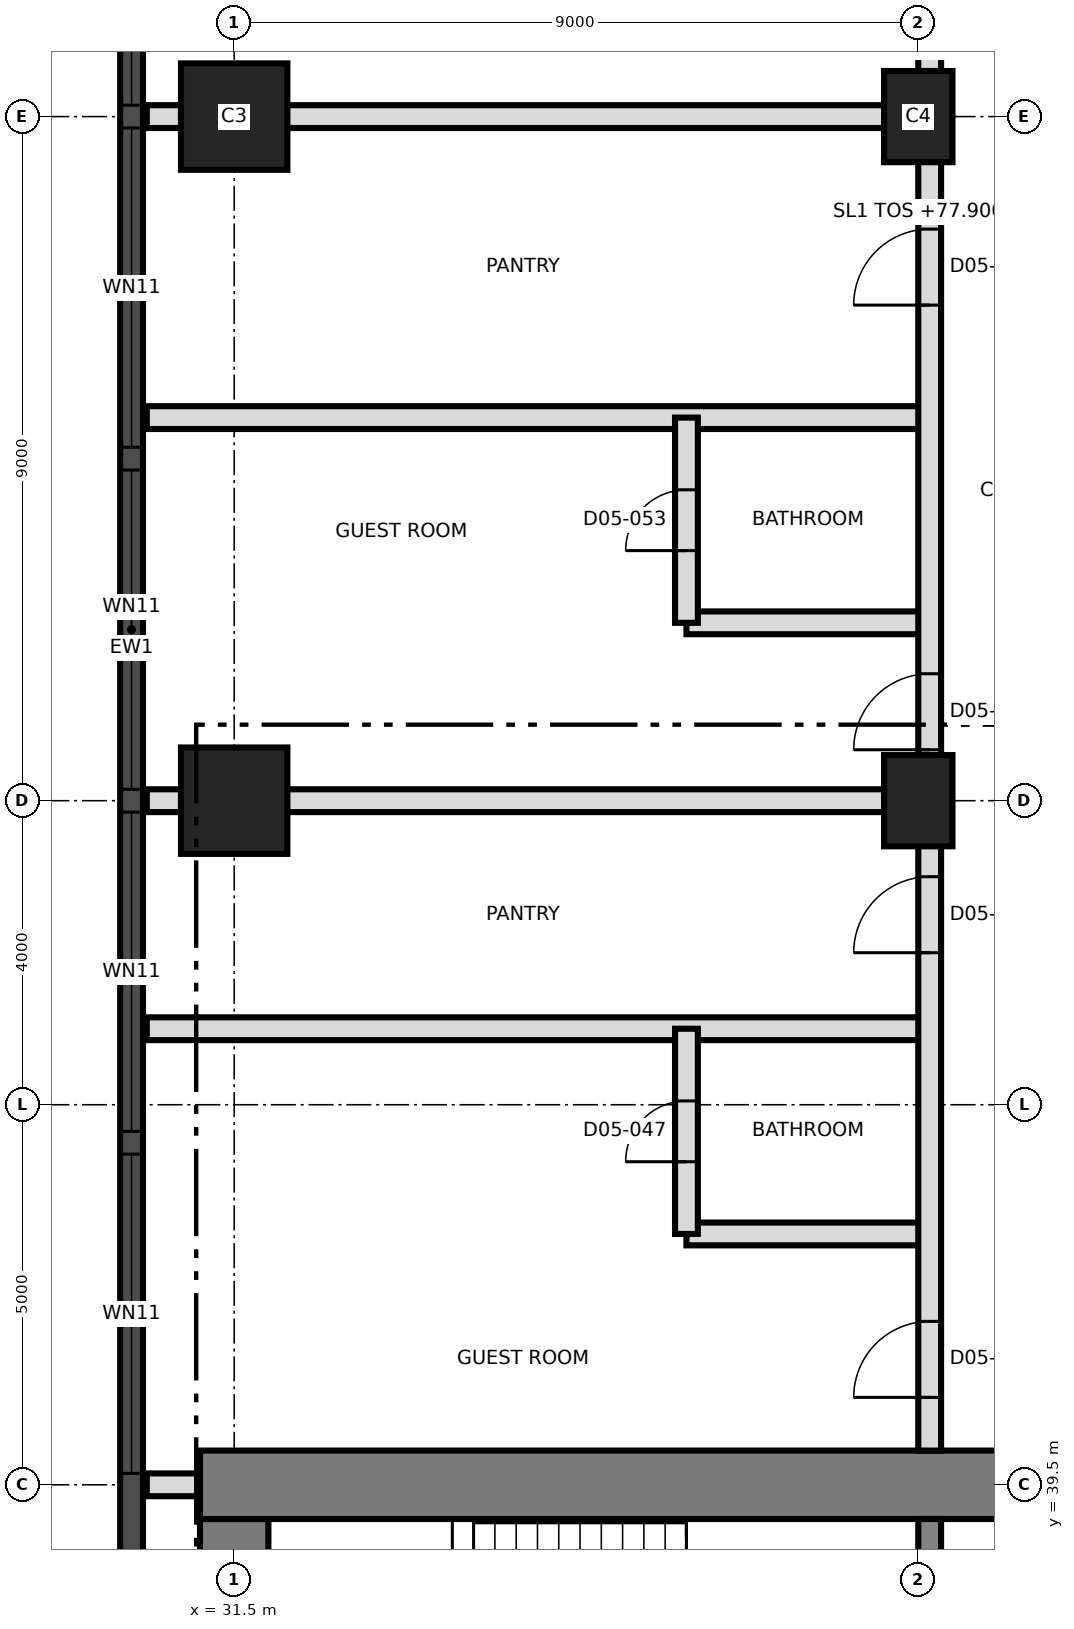
"""IFC4 building model, lengths in metres.
Left out: names, types, materials, properties, quantities, classifications, styles, units other than length and angle.
Written with IfcOpenShell. Run it as: python <this file> out.ifc"""

import sys

from ifc_helpers import new_model, si_unit, direction, frame, frame_2d, origin, origin_2d, place, context, subcontext, project, spatial, rectangle, extrude, element, fill, save


model = new_model("IFC4")
c1 = context("Model", 3, precision=1e-05, world=origin(), true_north=direction((0.0, 1.0)))
c2 = subcontext(c1, "Body", "Model", "MODEL_VIEW")
j1 = project(units=[si_unit("LENGTHUNIT", "METRE"), si_unit("PLANEANGLEUNIT", "RADIAN")], contexts=[c1])
p1 = place(None, origin())
s1 = spatial("IfcSite", under=j1, at=p1, CompositionType="ELEMENT")
p2 = place(p1, origin())
s2 = spatial("IfcBuilding", under=s1, at=p2, CompositionType="ELEMENT")
p3 = place(p2, frame((0.0, 0.0, 77.9)))
s3 = spatial("IfcBuildingStorey", under=s2, at=p3, CompositionType="ELEMENT", Elevation=77.9)
p4 = place(p3, frame((31.5, 21.95, 0.0), z_axis=(0.0, 0.0, 1.0), x_axis=(0.0, 1.0, 0.0)))
e1 = element("IfcWall", 1, at=p4, inside=s3, PredefinedType="SHEAR", context=c2, shape_type="SweptSolid", body=[
    extrude(rectangle(XDim=17.1, YDim=0.9, at=frame_2d((8.55, 0.0))), origin(), (0.0, 0.0, 1.0), 3.7),
])
p5 = place(p3, frame((31.05, 39.5, 0.0), z_axis=(0.0, 0.0, 1.0), x_axis=(1.0, 0.0, 0.0)))
e2 = element("IfcWall", 2, at=p5, inside=s3, PredefinedType="SHEAR", context=c2, shape_type="SweptSolid", body=[
    extrude(rectangle(XDim=27.0, YDim=0.9, at=frame_2d((13.5, 0.0))), origin(), (0.0, 0.0, 1.0), 3.7),
])
p6 = place(p5, frame((10.65, 0.0, 0.0)))
e3 = element("IfcOpeningElement", 3, at=p6, cuts=e2, PredefinedType="OPENING", context=c2, shape_type="SweptSolid", body=[
    extrude(rectangle(XDim=1.2, YDim=2.1, at=frame_2d((0.6, 1.05))), frame((0.0, 0.46, 0.0), z_axis=(0.0, -1.0, 0.0), x_axis=(1.0, 0.0, 0.0)), (0.0, 0.0, 1.0), 0.92),
])
p7 = place(p3, frame((40.65, 33.5, 0.0), z_axis=(0.0, 0.0, 1.0), x_axis=(0.0, 1.0, 0.0)))
e4 = element("IfcWall", 4, at=p7, inside=s3, PredefinedType="SHEAR", context=c2, shape_type="SweptSolid", body=[
    extrude(rectangle(XDim=5.55, YDim=0.3, at=frame_2d((2.775, 0.0))), origin(), (0.0, 0.0, 1.0), 3.7),
])
p8 = place(p3, frame((31.5, 48.5, 0.0), z_axis=(0.0, 0.0, 1.0), x_axis=(1.0, 0.0, 0.0)))
e5 = element("IfcColumn", 5, at=p8, inside=s3, PredefinedType="COLUMN", context=c2, shape_type="SweptSolid", body=[
    extrude(rectangle(XDim=1.4, YDim=1.4, at=origin_2d()), origin(), (0.0, 0.0, 1.0), 3.7),
])
p9 = place(p3, frame((40.5, 48.5, 0.0), z_axis=(0.0, 0.0, 1.0), x_axis=(0.0, 1.0, 0.0)))
e6 = element("IfcColumn", 6, at=p9, inside=s3, PredefinedType="COLUMN", context=c2, shape_type="SweptSolid", body=[
    extrude(rectangle(XDim=1.2, YDim=0.9, at=origin_2d()), origin(), (0.0, 0.0, 1.0), 3.7),
])
p10 = place(p3, frame((31.5, 57.5, 0.0), z_axis=(0.0, 0.0, 1.0), x_axis=(1.0, 0.0, 0.0)))
e7 = element("IfcColumn", 7, at=p10, inside=s3, PredefinedType="COLUMN", context=c2, shape_type="SweptSolid", body=[
    extrude(rectangle(XDim=1.4, YDim=1.4, at=origin_2d()), origin(), (0.0, 0.0, 1.0), 3.7),
])
p11 = place(p3, frame((40.5, 57.5, 0.0), z_axis=(0.0, 0.0, 1.0), x_axis=(0.0, 1.0, 0.0)))
e8 = element("IfcColumn", 8, at=p11, inside=s3, PredefinedType="COLUMN", context=c2, shape_type="SweptSolid", body=[
    extrude(rectangle(XDim=1.2, YDim=0.9, at=origin_2d()), origin(), (0.0, 0.0, 1.0), 3.7),
])
p12 = place(p3, frame((30.15, 66.992, 0.0), z_axis=(0.0, 0.0, 1.0), x_axis=(0.0, -1.0, 0.0)))
e9 = element("IfcWall", 9, at=p12, inside=s3, PredefinedType="SOLIDWALL", context=c2, shape_type="SweptSolid", body=[
    extrude(rectangle(XDim=32.968, YDim=0.3, at=frame_2d((16.484, 0.0))), origin(), (0.0, 0.0, 1.0), 3.4),
])
p13 = place(p12, frame((1.596, 0.0, 0.3)))
e10 = element("IfcOpeningElement", 10, at=p13, cuts=e9, PredefinedType="OPENING", context=c2, shape_type="SweptSolid", body=[
    extrude(rectangle(XDim=1.8, YDim=2.4, at=frame_2d((0.9, 1.2))), frame((0.0, 0.16, 0.0), z_axis=(0.0, -1.0, 0.0), x_axis=(1.0, 0.0, 0.0)), (0.0, 0.0, 1.0), 0.32),
])
p14 = place(p12, frame((5.142, 0.0, 0.9)))
e11 = element("IfcOpeningElement", 11, at=p14, cuts=e9, PredefinedType="OPENING", context=c2, shape_type="SweptSolid", body=[
    extrude(rectangle(XDim=4.2, YDim=1.5, at=frame_2d((2.1, 0.75))), frame((0.0, 0.16, 0.0), z_axis=(0.0, -1.0, 0.0), x_axis=(1.0, 0.0, 0.0)), (0.0, 0.0, 1.0), 0.32),
])
p15 = place(p12, frame((9.642, 0.0, 0.9)))
e12 = element("IfcOpeningElement", 12, at=p15, cuts=e9, PredefinedType="OPENING", context=c2, shape_type="SweptSolid", body=[
    extrude(rectangle(XDim=4.2, YDim=1.5, at=frame_2d((2.1, 0.75))), frame((0.0, 0.16, 0.0), z_axis=(0.0, -1.0, 0.0), x_axis=(1.0, 0.0, 0.0)), (0.0, 0.0, 1.0), 0.32),
])
p16 = place(p12, frame((14.142, 0.0, 0.9)))
e13 = element("IfcOpeningElement", 13, at=p16, cuts=e9, PredefinedType="OPENING", context=c2, shape_type="SweptSolid", body=[
    extrude(rectangle(XDim=4.2, YDim=1.5, at=frame_2d((2.1, 0.75))), frame((0.0, 0.16, 0.0), z_axis=(0.0, -1.0, 0.0), x_axis=(1.0, 0.0, 0.0)), (0.0, 0.0, 1.0), 0.32),
])
p17 = place(p12, frame((18.642, 0.0, 0.9)))
e14 = element("IfcOpeningElement", 14, at=p17, cuts=e9, PredefinedType="OPENING", context=c2, shape_type="SweptSolid", body=[
    extrude(rectangle(XDim=4.2, YDim=1.5, at=frame_2d((2.1, 0.75))), frame((0.0, 0.16, 0.0), z_axis=(0.0, -1.0, 0.0), x_axis=(1.0, 0.0, 0.0)), (0.0, 0.0, 1.0), 0.32),
])
p18 = place(p12, frame((23.142, 0.0, 0.9)))
e15 = element("IfcOpeningElement", 15, at=p18, cuts=e9, PredefinedType="OPENING", context=c2, shape_type="SweptSolid", body=[
    extrude(rectangle(XDim=4.2, YDim=1.5, at=frame_2d((2.1, 0.75))), frame((0.0, 0.16, 0.0), z_axis=(0.0, -1.0, 0.0), x_axis=(1.0, 0.0, 0.0)), (0.0, 0.0, 1.0), 0.32),
])
p19 = place(p12, frame((29.33, 0.0, 0.3)))
e16 = element("IfcOpeningElement", 16, at=p19, cuts=e9, PredefinedType="OPENING", context=c2, shape_type="SweptSolid", body=[
    extrude(rectangle(XDim=1.8, YDim=2.4, at=frame_2d((0.9, 1.2))), frame((0.0, 0.16, 0.0), z_axis=(0.0, -1.0, 0.0), x_axis=(1.0, 0.0, 0.0)), (0.0, 0.0, 1.0), 0.32),
])
p20 = place(p3, frame((30.35, 39.5, 0.0), z_axis=(0.0, 0.0, 1.0), x_axis=(1.0, 0.0, 0.0)))
e17 = element("IfcWall", 17, at=p20, inside=s3, PredefinedType="PARTITIONING", context=c2, shape_type="SweptSolid", body=[
    extrude(rectangle(XDim=0.68, YDim=0.3, at=frame_2d((0.34, 0.0))), origin(), (0.0, 0.0, 1.0), 3.4),
])
p21 = place(p3, frame((37.45, 42.8, 0.0), z_axis=(0.0, 0.0, 1.0), x_axis=(1.0, 0.0, 0.0)))
e18 = element("IfcWall", 18, at=p21, inside=s3, PredefinedType="PARTITIONING", context=c2, shape_type="SweptSolid", body=[
    extrude(rectangle(XDim=3.2, YDim=0.3, at=frame_2d((1.6, 0.0))), origin(), (0.0, 0.0, 1.0), 3.4),
])
for number, where, z_axis, x_axis in (
    (19, (30.35, 45.5, 0.0), (0.0, 0.0, 1.0), (1.0, 0.0, 0.0)),
    (20, (30.35, 48.5, 0.0), (0.0, 0.0, 1.0), (1.0, 0.0, 0.0)),
):
    element("IfcWall", number, at=place(p3, frame(where, z_axis=z_axis, x_axis=x_axis)), inside=s3, PredefinedType="PARTITIONING", context=c2, shape_type="SweptSolid", body=[
        extrude(rectangle(XDim=10.3, YDim=0.3, at=frame_2d((5.15, 0.0))), origin(), (0.0, 0.0, 1.0), 3.4),
    ])
p22 = place(p3, frame((37.45, 50.84, 0.0), z_axis=(0.0, 0.0, 1.0), x_axis=(1.0, 0.0, 0.0)))
e21 = element("IfcWall", 21, at=p22, inside=s3, PredefinedType="PARTITIONING", context=c2, shape_type="SweptSolid", body=[
    extrude(rectangle(XDim=3.2, YDim=0.3, at=frame_2d((1.6, 0.0))), origin(), (0.0, 0.0, 1.0), 3.4),
])
for number, where, z_axis, x_axis in (
    (22, (30.35, 53.54, 0.0), (0.0, 0.0, 1.0), (1.0, 0.0, 0.0)),
    (23, (30.35, 57.5, 0.0), (0.0, 0.0, 1.0), (1.0, 0.0, 0.0)),
):
    element("IfcWall", number, at=place(p3, frame(where, z_axis=z_axis, x_axis=x_axis)), inside=s3, PredefinedType="PARTITIONING", context=c2, shape_type="SweptSolid", body=[
        extrude(rectangle(XDim=10.3, YDim=0.3, at=frame_2d((5.15, 0.0))), origin(), (0.0, 0.0, 1.0), 3.4),
    ])
p23 = place(p3, frame((37.45, 42.8, 0.0), z_axis=(0.0, 0.0, 1.0), x_axis=(0.0, 1.0, 0.0)))
e24 = element("IfcWall", 24, at=p23, inside=s3, PredefinedType="PARTITIONING", context=c2, shape_type="SweptSolid", body=[
    extrude(rectangle(XDim=2.7, YDim=0.3, at=frame_2d((1.35, 0.0))), origin(), (0.0, 0.0, 1.0), 3.4),
])
p24 = place(p23, frame((0.95, 0.0, 0.0)))
e25 = element("IfcOpeningElement", 25, at=p24, cuts=e24, PredefinedType="OPENING", context=c2, shape_type="SweptSolid", body=[
    extrude(rectangle(XDim=0.8, YDim=2.1, at=frame_2d((0.4, 1.05))), frame((0.0, 0.16, 0.0), z_axis=(0.0, -1.0, 0.0), x_axis=(1.0, 0.0, 0.0)), (0.0, 0.0, 1.0), 0.32),
])
p25 = place(p3, frame((37.45, 50.84, 0.0), z_axis=(0.0, 0.0, 1.0), x_axis=(0.0, 1.0, 0.0)))
e26 = element("IfcWall", 26, at=p25, inside=s3, PredefinedType="PARTITIONING", context=c2, shape_type="SweptSolid", body=[
    extrude(rectangle(XDim=2.7, YDim=0.3, at=frame_2d((1.35, 0.0))), origin(), (0.0, 0.0, 1.0), 3.4),
])
p26 = place(p25, frame((0.95, 0.0, 0.0)))
e27 = element("IfcOpeningElement", 27, at=p26, cuts=e26, PredefinedType="OPENING", context=c2, shape_type="SweptSolid", body=[
    extrude(rectangle(XDim=0.8, YDim=2.1, at=frame_2d((0.4, 1.05))), frame((0.0, 0.16, 0.0), z_axis=(0.0, -1.0, 0.0), x_axis=(1.0, 0.0, 0.0)), (0.0, 0.0, 1.0), 0.32),
])
p27 = place(p3, frame((40.65, 39.95, 0.0), z_axis=(0.0, 0.0, 1.0), x_axis=(0.0, 1.0, 0.0)))
e28 = element("IfcWall", 28, at=p27, inside=s3, PredefinedType="PARTITIONING", context=c2, shape_type="SweptSolid", body=[
    extrude(rectangle(XDim=36.94, YDim=0.3, at=frame_2d((18.47, 0.0))), origin(), (0.0, 0.0, 1.0), 3.4),
])
p28 = place(p27, frame((0.7, 0.0, 0.0)))
e29 = element("IfcOpeningElement", 29, at=p28, cuts=e28, PredefinedType="OPENING", context=c2, shape_type="SweptSolid", body=[
    extrude(rectangle(XDim=1.0, YDim=2.1, at=frame_2d((0.5, 1.05))), frame((0.0, 0.16, 0.0), z_axis=(0.0, -1.0, 0.0), x_axis=(1.0, 0.0, 0.0)), (0.0, 0.0, 1.0), 0.32),
])
p29 = place(p27, frame((6.55, 0.0, 0.0)))
e30 = element("IfcOpeningElement", 30, at=p29, cuts=e28, PredefinedType="OPENING", context=c2, shape_type="SweptSolid", body=[
    extrude(rectangle(XDim=1.0, YDim=2.1, at=frame_2d((0.5, 1.05))), frame((0.0, 0.16, 0.0), z_axis=(0.0, -1.0, 0.0), x_axis=(1.0, 0.0, 0.0)), (0.0, 0.0, 1.0), 0.32),
])
p30 = place(p27, frame((9.22, 0.0, 0.0)))
e31 = element("IfcOpeningElement", 31, at=p30, cuts=e28, PredefinedType="OPENING", context=c2, shape_type="SweptSolid", body=[
    extrude(rectangle(XDim=1.0, YDim=2.1, at=frame_2d((0.5, 1.05))), frame((0.0, 0.16, 0.0), z_axis=(0.0, -1.0, 0.0), x_axis=(1.0, 0.0, 0.0)), (0.0, 0.0, 1.0), 0.32),
])
p31 = place(p27, frame((15.07, 0.0, 0.0)))
e32 = element("IfcOpeningElement", 32, at=p31, cuts=e28, PredefinedType="OPENING", context=c2, shape_type="SweptSolid", body=[
    extrude(rectangle(XDim=1.0, YDim=2.1, at=frame_2d((0.5, 1.05))), frame((0.0, 0.16, 0.0), z_axis=(0.0, -1.0, 0.0), x_axis=(1.0, 0.0, 0.0)), (0.0, 0.0, 1.0), 0.32),
])
p32 = place(p27, frame((21.05, 0.0, 0.0)))
e33 = element("IfcOpeningElement", 33, at=p32, cuts=e28, PredefinedType="OPENING", context=c2, shape_type="SweptSolid", body=[
    extrude(rectangle(XDim=1.0, YDim=2.4, at=frame_2d((0.5, 1.2))), frame((0.0, 0.16, 0.0), z_axis=(0.0, -1.0, 0.0), x_axis=(1.0, 0.0, 0.0)), (0.0, 0.0, 1.0), 0.32),
])
p33 = place(p14, origin())
e34 = element("IfcWindow", 34, at=p33, inside=s3, PartitioningType="SINGLE_PANEL", PredefinedType="WINDOW", context=c2, shape_type="SweptSolid", body=[
    extrude(rectangle(XDim=4.2, YDim=1.5, at=frame_2d((2.1, 0.75))), frame((0.0, 0.03, 0.0), z_axis=(0.0, -1.0, 0.0), x_axis=(1.0, 0.0, 0.0)), (0.0, 0.0, 1.0), 0.06),
])
fill(e11, e34)
p34 = place(p15, origin())
e35 = element("IfcWindow", 35, at=p34, inside=s3, PartitioningType="SINGLE_PANEL", PredefinedType="WINDOW", context=c2, shape_type="SweptSolid", body=[
    extrude(rectangle(XDim=4.2, YDim=1.5, at=frame_2d((2.1, 0.75))), frame((0.0, 0.03, 0.0), z_axis=(0.0, -1.0, 0.0), x_axis=(1.0, 0.0, 0.0)), (0.0, 0.0, 1.0), 0.06),
])
fill(e12, e35)
p35 = place(p16, origin())
e36 = element("IfcWindow", 36, at=p35, inside=s3, PartitioningType="SINGLE_PANEL", PredefinedType="WINDOW", context=c2, shape_type="SweptSolid", body=[
    extrude(rectangle(XDim=4.2, YDim=1.5, at=frame_2d((2.1, 0.75))), frame((0.0, 0.03, 0.0), z_axis=(0.0, -1.0, 0.0), x_axis=(1.0, 0.0, 0.0)), (0.0, 0.0, 1.0), 0.06),
])
fill(e13, e36)
p36 = place(p17, origin())
e37 = element("IfcWindow", 37, at=p36, inside=s3, PartitioningType="SINGLE_PANEL", PredefinedType="WINDOW", context=c2, shape_type="SweptSolid", body=[
    extrude(rectangle(XDim=4.2, YDim=1.5, at=frame_2d((2.1, 0.75))), frame((0.0, 0.03, 0.0), z_axis=(0.0, -1.0, 0.0), x_axis=(1.0, 0.0, 0.0)), (0.0, 0.0, 1.0), 0.06),
])
fill(e14, e37)
p37 = place(p18, origin())
e38 = element("IfcWindow", 38, at=p37, inside=s3, PartitioningType="SINGLE_PANEL", PredefinedType="WINDOW", context=c2, shape_type="SweptSolid", body=[
    extrude(rectangle(XDim=4.2, YDim=1.5, at=frame_2d((2.1, 0.75))), frame((0.0, 0.03, 0.0), z_axis=(0.0, -1.0, 0.0), x_axis=(1.0, 0.0, 0.0)), (0.0, 0.0, 1.0), 0.06),
])
fill(e15, e38)
p38 = place(p24, origin())
e39 = element("IfcDoor", 39, at=p38, inside=s3, OperationType="SINGLE_SWING_LEFT", PredefinedType="DOOR", context=c2, shape_type="SweptSolid", body=[
    extrude(rectangle(XDim=0.8, YDim=2.1, at=frame_2d((0.4, 1.05))), frame((0.0, 0.025, 0.0), z_axis=(0.0, -1.0, 0.0), x_axis=(1.0, 0.0, 0.0)), (0.0, 0.0, 1.0), 0.05),
])
fill(e25, e39)
p39 = place(p28, origin())
e40 = element("IfcDoor", 40, at=p39, inside=s3, OperationType="SINGLE_SWING_LEFT", PredefinedType="DOOR", context=c2, shape_type="SweptSolid", body=[
    extrude(rectangle(XDim=1.0, YDim=2.1, at=frame_2d((0.5, 1.05))), frame((0.0, 0.025, 0.0), z_axis=(0.0, -1.0, 0.0), x_axis=(1.0, 0.0, 0.0)), (0.0, 0.0, 1.0), 0.05),
])
fill(e29, e40)
p40 = place(p29, origin())
e41 = element("IfcDoor", 41, at=p40, inside=s3, OperationType="SINGLE_SWING_RIGHT", PredefinedType="DOOR", context=c2, shape_type="SweptSolid", body=[
    extrude(rectangle(XDim=1.0, YDim=2.1, at=frame_2d((0.5, 1.05))), frame((0.0, 0.025, 0.0), z_axis=(0.0, -1.0, 0.0), x_axis=(1.0, 0.0, 0.0)), (0.0, 0.0, 1.0), 0.05),
])
fill(e30, e41)
p41 = place(p26, origin())
e42 = element("IfcDoor", 42, at=p41, inside=s3, OperationType="SINGLE_SWING_LEFT", PredefinedType="DOOR", context=c2, shape_type="SweptSolid", body=[
    extrude(rectangle(XDim=0.8, YDim=2.1, at=frame_2d((0.4, 1.05))), frame((0.0, 0.025, 0.0), z_axis=(0.0, -1.0, 0.0), x_axis=(1.0, 0.0, 0.0)), (0.0, 0.0, 1.0), 0.05),
])
fill(e27, e42)
p42 = place(p30, origin())
e43 = element("IfcDoor", 43, at=p42, inside=s3, OperationType="SINGLE_SWING_LEFT", PredefinedType="DOOR", context=c2, shape_type="SweptSolid", body=[
    extrude(rectangle(XDim=1.0, YDim=2.1, at=frame_2d((0.5, 1.05))), frame((0.0, 0.025, 0.0), z_axis=(0.0, -1.0, 0.0), x_axis=(1.0, 0.0, 0.0)), (0.0, 0.0, 1.0), 0.05),
])
fill(e31, e43)
p43 = place(p31, origin())
e44 = element("IfcDoor", 44, at=p43, inside=s3, OperationType="SINGLE_SWING_RIGHT", PredefinedType="DOOR", context=c2, shape_type="SweptSolid", body=[
    extrude(rectangle(XDim=1.0, YDim=2.1, at=frame_2d((0.5, 1.05))), frame((0.0, 0.025, 0.0), z_axis=(0.0, -1.0, 0.0), x_axis=(1.0, 0.0, 0.0)), (0.0, 0.0, 1.0), 0.05),
])
fill(e32, e44)
save(model, sys.argv[1])
